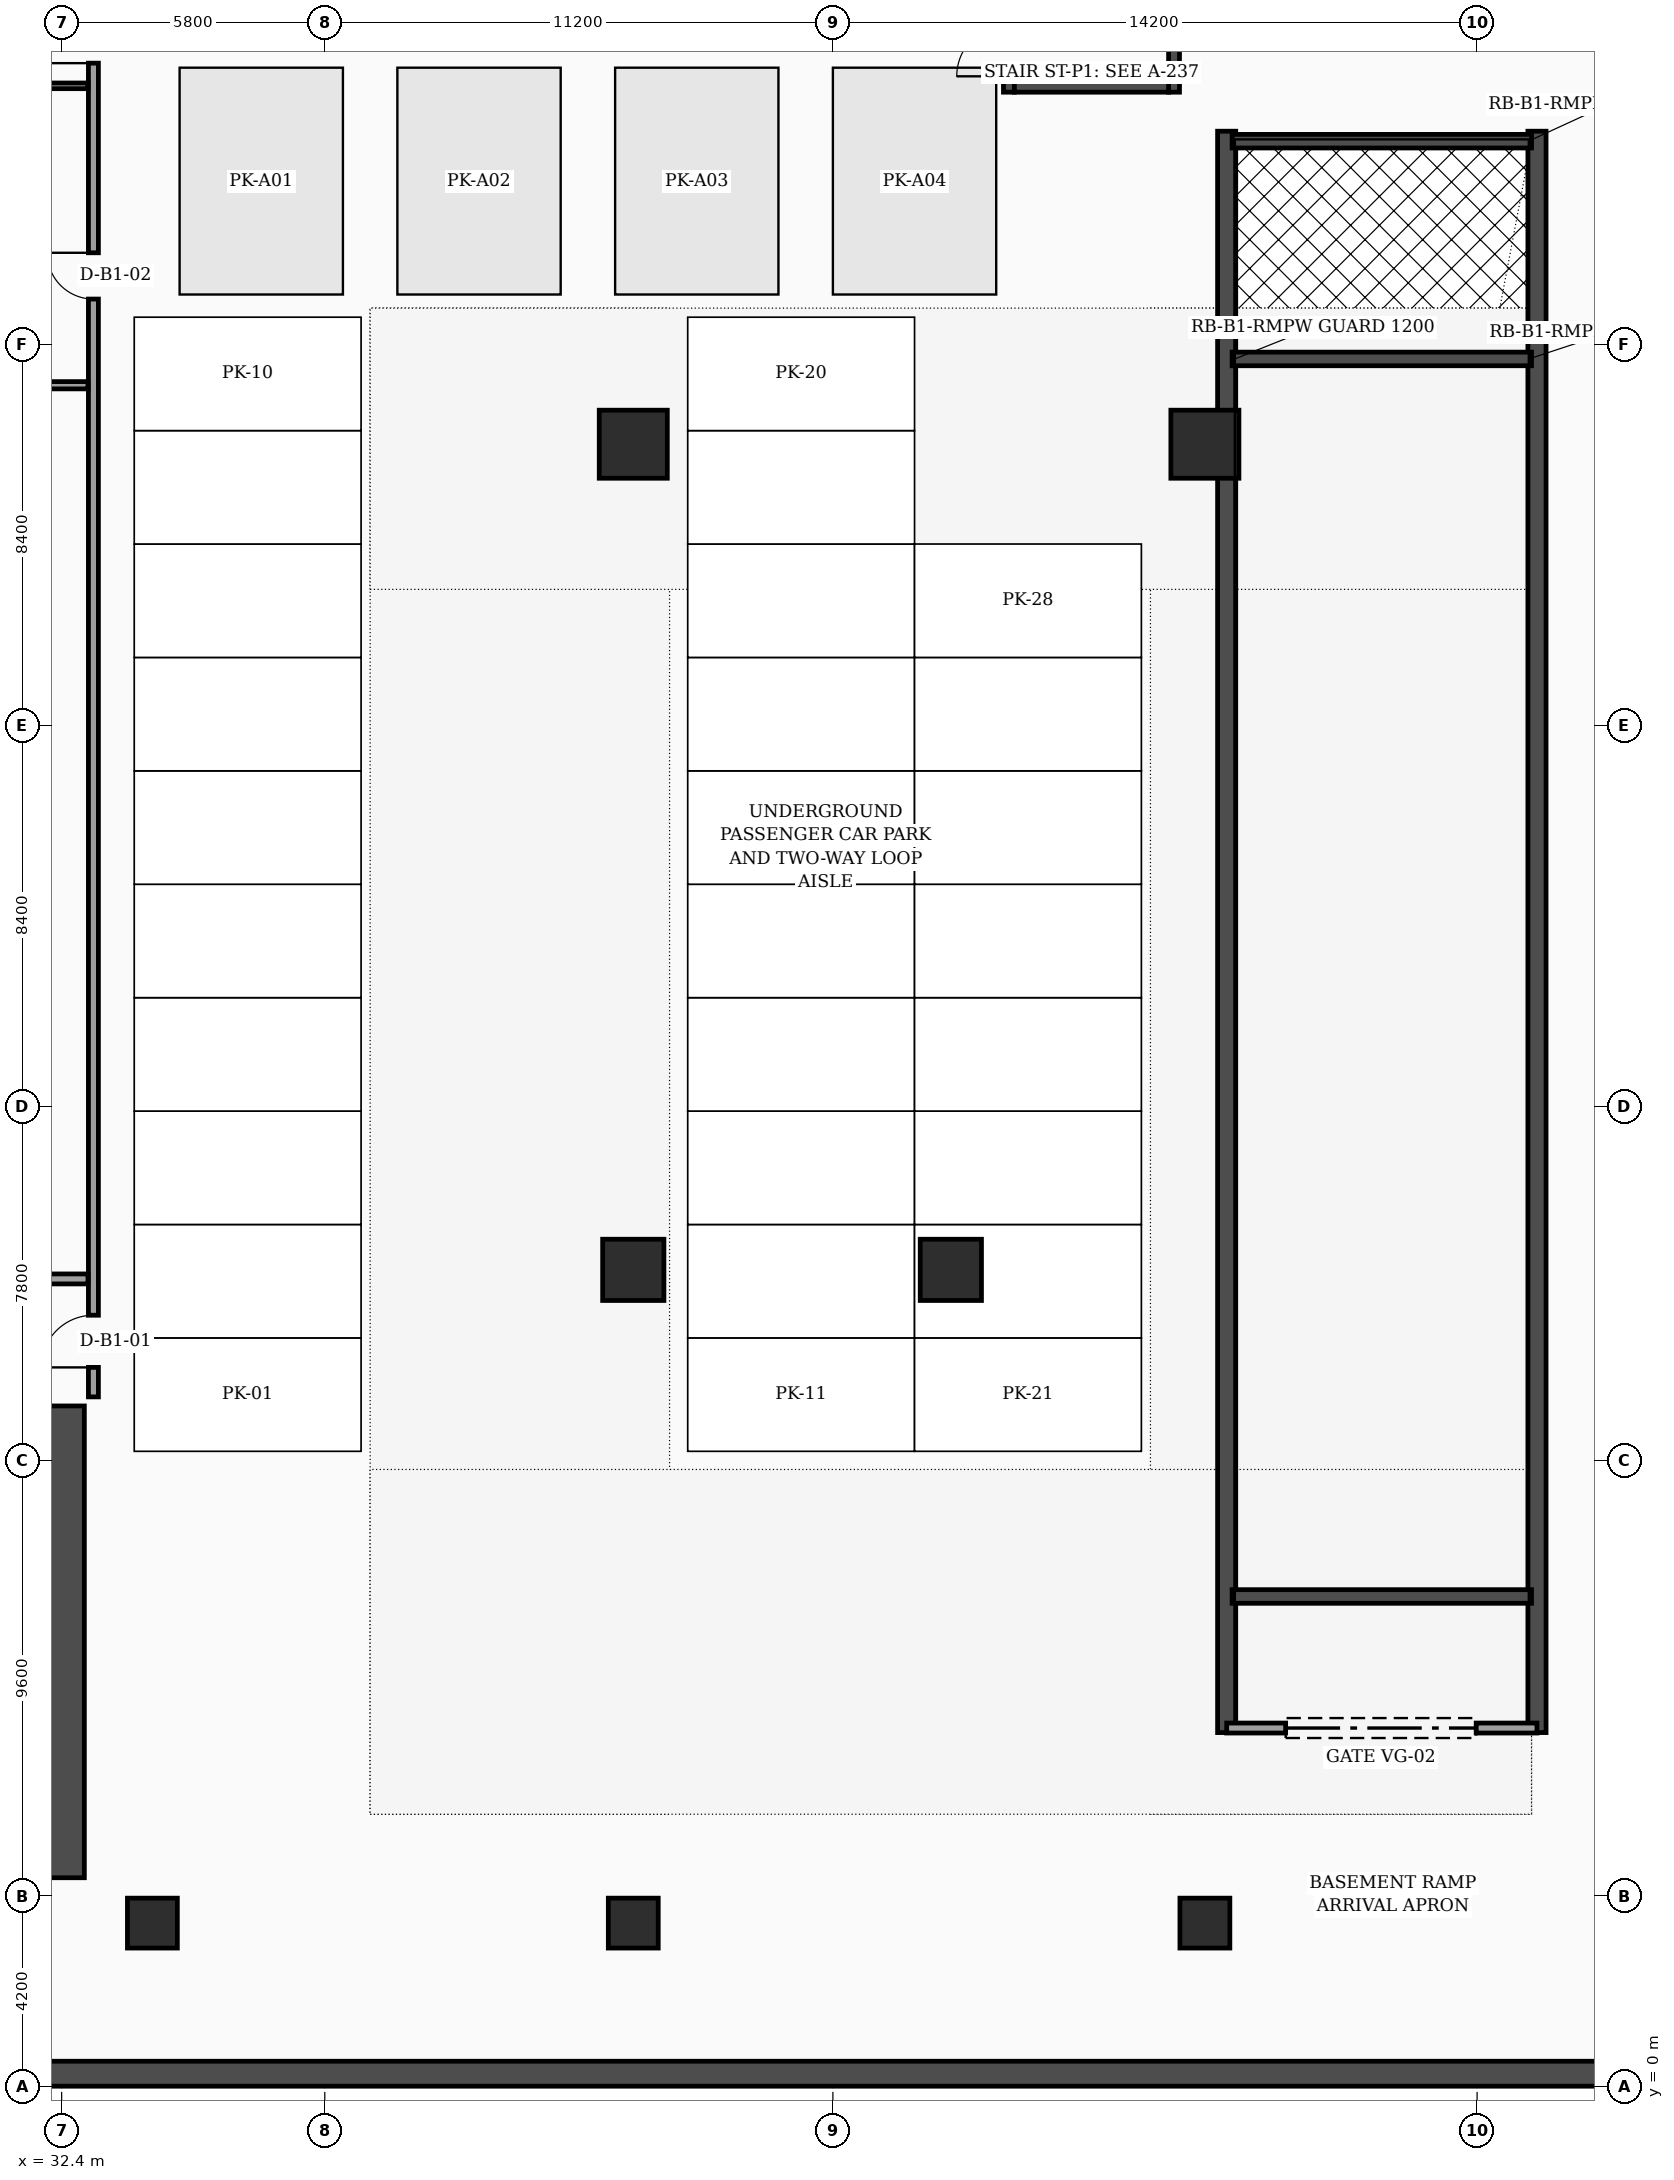
"""IFC4 building model, lengths in metres.
Left out: names, types, materials, properties, quantities, classifications, styles, units other than length and angle.
Written with IfcOpenShell. Run it as: python <this file> out.ifc"""

import sys

from ifc_helpers import new_model, si_unit, direction, frame, frame_2d, origin, origin_2d, place, context, subcontext, project, spatial, rectangle, hollow_rectangle, extrude, element, fill, save


model = new_model("IFC4")
c1 = context("Model", 3, precision=1e-05, world=origin(), true_north=direction((0.0, 1.0)))
c2 = subcontext(c1, "Body", "Model", "MODEL_VIEW")
j1 = project(units=[si_unit("LENGTHUNIT", "METRE"), si_unit("PLANEANGLEUNIT", "RADIAN")], contexts=[c1])
p1 = place(None, origin())
s1 = spatial("IfcSite", under=j1, at=p1, CompositionType="ELEMENT")
p2 = place(p1, origin())
s2 = spatial("IfcBuilding", under=s1, at=p2, CompositionType="ELEMENT")
p3 = place(p2, frame((0.0, 0.0, -5.2)))
s3 = spatial("IfcBuildingStorey", under=s2, at=p3, CompositionType="ELEMENT", Elevation=-5.2)
p4 = place(p3, frame((0.28, 0.28, 0.0), z_axis=(0.0, 0.0, 1.0), x_axis=(1.0, 0.0, 0.0)))
e1 = element("IfcWall", 1, at=p4, inside=s3, PredefinedType="USERDEFINED", context=c2, shape_type="SweptSolid", body=[
    extrude(rectangle(XDim=83.44, YDim=0.55, at=frame_2d((41.72, 0.0))), origin(), (0.0, 0.0, 1.0), 4.88),
])
p5 = place(p3, frame((32.4, 4.6, 0.0), z_axis=(0.0, 0.0, 1.0), x_axis=(0.0, 1.0, 0.0)))
e2 = element("IfcWall", 2, at=p5, inside=s3, PredefinedType="SHEAR", context=c2, shape_type="SweptSolid", body=[
    extrude(rectangle(XDim=10.4, YDim=1.0, at=frame_2d((5.2, 0.0))), origin(), (0.0, 0.0, 1.0), 4.88),
])
p6 = place(p3, frame((53.28, 43.96, 0.0), z_axis=(0.0, 0.0, 1.0), x_axis=(0.0, 1.0, 0.0)))
e3 = element("IfcWall", 3, at=p6, inside=s3, PredefinedType="SOLIDWALL", context=c2, shape_type="SweptSolid", body=[
    extrude(rectangle(XDim=9.58, YDim=0.24, at=frame_2d((4.79, 0.0))), origin(), (0.0, 0.0, 1.0), 4.88),
])
p7 = place(p6, frame((0.35, 0.0, 0.0)))
e4 = element("IfcOpeningElement", 4, at=p7, cuts=e3, PredefinedType="OPENING", context=c2, shape_type="SweptSolid", body=[
    extrude(rectangle(XDim=1.15, YDim=2.2, at=frame_2d((0.575, 1.1))), frame((0.0, 0.13, 0.0), z_axis=(0.0, -1.0, 0.0), x_axis=(1.0, 0.0, 0.0)), (0.0, 0.0, 1.0), 0.26),
])
p8 = place(p3, frame((56.92, 43.96, 0.0), z_axis=(0.0, 0.0, 1.0), x_axis=(0.0, 1.0, 0.0)))
e5 = element("IfcWall", 5, at=p8, inside=s3, PredefinedType="SOLIDWALL", context=c2, shape_type="SweptSolid", body=[
    extrude(rectangle(XDim=9.58, YDim=0.24, at=frame_2d((4.79, 0.0))), origin(), (0.0, 0.0, 1.0), 4.88),
])
p9 = place(p3, frame((53.4, 44.08, 0.0), z_axis=(0.0, 0.0, 1.0), x_axis=(1.0, 0.0, 0.0)))
e6 = element("IfcWall", 6, at=p9, inside=s3, PredefinedType="SOLIDWALL", context=c2, shape_type="SweptSolid", body=[
    extrude(rectangle(XDim=3.4, YDim=0.24, at=frame_2d((1.7, 0.0))), origin(), (0.0, 0.0, 1.0), 4.88),
])
for number, where, z_axis, x_axis in (
    (7, (34.4, 3.6, 0.0), (0.0, 0.0, 1.0), (1.0, 0.0, 0.0)),
    (8, (45.0, 3.6, 0.0), (0.0, 0.0, 1.0), (1.0, 0.0, 0.0)),
    (9, (57.6, 3.6, 0.0), (0.0, 0.0, 1.0), (1.0, 0.0, 0.0)),
):
    element("IfcColumn", number, at=place(p3, frame(where, z_axis=z_axis, x_axis=x_axis)), inside=s3, PredefinedType="COLUMN", context=c2, shape_type="SweptSolid", body=[
        extrude(hollow_rectangle(XDim=1.1, YDim=1.1, WallThickness=0.045, at=origin_2d()), origin(), (0.0, 0.0, 1.0), 4.88),
    ])
for number, where, z_axis, x_axis in (
    (10, (45.0, 36.2, 0.0), (0.0, 0.0, 1.0), (1.0, 0.0, 0.0)),
    (11, (57.6, 36.2, 0.0), (0.0, 0.0, 1.0), (1.0, 0.0, 0.0)),
):
    element("IfcColumn", number, at=place(p3, frame(where, z_axis=z_axis, x_axis=x_axis)), inside=s3, PredefinedType="COLUMN", context=c2, shape_type="SweptSolid", body=[
        extrude(rectangle(XDim=1.5, YDim=1.5, at=origin_2d()), origin(), (0.0, 0.0, 1.0), 4.88),
    ])
for number, where, z_axis, x_axis in (
    (12, (45.0, 18.0, 0.0), (0.0, 0.0, 1.0), (1.0, 0.0, 0.0)),
    (13, (52.0, 18.0, 0.0), (0.0, 0.0, 1.0), (1.0, 0.0, 0.0)),
):
    element("IfcColumn", number, at=place(p3, frame(where, z_axis=z_axis, x_axis=x_axis)), inside=s3, PredefinedType="COLUMN", context=c2, shape_type="SweptSolid", body=[
        extrude(rectangle(XDim=1.35, YDim=1.35, at=origin_2d()), origin(), (0.0, 0.0, 1.0), 4.88),
    ])
for number, where, z_axis, x_axis in (
    (14, (58.08, 7.8, 0.0), (0.0, 0.0, 1.0), (0.0, 1.0, 0.0)),
    (15, (64.92, 7.8, 0.0), (0.0, 0.0, 1.0), (0.0, 1.0, 0.0)),
):
    element("IfcWall", number, at=place(p3, frame(where, z_axis=z_axis, x_axis=x_axis)), inside=s3, PredefinedType="USERDEFINED", context=c2, shape_type="SweptSolid", body=[
        extrude(rectangle(XDim=35.3, YDim=0.4, at=frame_2d((17.65, 0.0))), origin(), (0.0, 0.0, 1.0), 4.88),
    ])
p10 = place(p3, frame((58.2, 10.8, 0.0), z_axis=(0.0, 0.0, 1.0), x_axis=(1.0, 0.0, 0.0)))
e16 = element("IfcWall", 16, at=p10, inside=s3, PredefinedType="SOLIDWALL", context=c2, shape_type="SweptSolid", body=[
    extrude(rectangle(XDim=6.6, YDim=0.3, at=frame_2d((3.3, 0.0))), origin(), (0.0, 0.0, 1.0), 0.4),
])
p11 = place(p3, frame((58.2, 38.08, 0.0), z_axis=(0.0, 0.0, 1.0), x_axis=(1.0, 0.0, 0.0)))
e17 = element("IfcWall", 17, at=p11, inside=s3, PredefinedType="SOLIDWALL", context=c2, shape_type="SweptSolid", body=[
    extrude(rectangle(XDim=6.6, YDim=0.3, at=frame_2d((3.3, 0.0))), origin(), (0.0, 0.0, 1.0), 4.8),
])
p12 = place(p3, frame((58.2, 42.88, 0.0), z_axis=(0.0, 0.0, 1.0), x_axis=(1.0, 0.0, 0.0)))
e18 = element("IfcWall", 18, at=p12, inside=s3, PredefinedType="SOLIDWALL", context=c2, shape_type="SweptSolid", body=[
    extrude(rectangle(XDim=6.6, YDim=0.3, at=frame_2d((3.3, 0.0))), origin(), (0.0, 0.0, 1.0), 4.88),
])
p13 = place(p3, frame((58.08, 7.9, 0.0), z_axis=(0.0, 0.0, 1.0), x_axis=(1.0, 0.0, 0.0)))
e19 = element("IfcWall", 19, at=p13, inside=s3, PredefinedType="SOLIDWALL", context=c2, shape_type="SweptSolid", body=[
    extrude(rectangle(XDim=6.84, YDim=0.22, at=frame_2d((3.42, 0.0))), origin(), (0.0, 0.0, 1.0), 4.08),
])
p14 = place(p13, frame((1.3, 0.0, 0.0)))
e20 = element("IfcOpeningElement", 20, at=p14, cuts=e19, PredefinedType="OPENING", context=c2, shape_type="SweptSolid", body=[
    extrude(rectangle(XDim=4.2, YDim=2.8, at=frame_2d((2.1, 1.4))), frame((0.0, 0.12, 0.0), z_axis=(0.0, -1.0, 0.0), x_axis=(1.0, 0.0, 0.0)), (0.0, 0.0, 1.0), 0.24),
])
p15 = place(p3, frame((33.1, 15.2, 0.0), z_axis=(0.0, 0.0, 1.0), x_axis=(0.0, 1.0, 0.0)))
e21 = element("IfcWall", 21, at=p15, inside=s3, PredefinedType="SOLIDWALL", context=c2, shape_type="SweptSolid", body=[
    extrude(rectangle(XDim=42.38, YDim=0.22, at=frame_2d((21.19, 0.0))), origin(), (0.0, 0.0, 1.0), 4.08),
])
p16 = place(p15, frame((0.65, 0.0, 0.0)))
e22 = element("IfcOpeningElement", 22, at=p16, cuts=e21, PredefinedType="OPENING", context=c2, shape_type="SweptSolid", body=[
    extrude(rectangle(XDim=1.15, YDim=2.2, at=frame_2d((0.575, 1.1))), frame((0.0, 0.12, 0.0), z_axis=(0.0, -1.0, 0.0), x_axis=(1.0, 0.0, 0.0)), (0.0, 0.0, 1.0), 0.24),
])
p17 = place(p15, frame((24.2, 0.0, 0.0)))
e23 = element("IfcOpeningElement", 23, at=p17, cuts=e21, PredefinedType="OPENING", context=c2, shape_type="SweptSolid", body=[
    extrude(rectangle(XDim=1.02, YDim=2.2, at=frame_2d((0.51, 1.1))), frame((0.0, 0.12, 0.0), z_axis=(0.0, -1.0, 0.0), x_axis=(1.0, 0.0, 0.0)), (0.0, 0.0, 1.0), 0.24),
])
p18 = place(p15, frame((29.4, 0.0, 0.0)))
e24 = element("IfcOpeningElement", 24, at=p18, cuts=e21, PredefinedType="OPENING", context=c2, shape_type="SweptSolid", body=[
    extrude(rectangle(XDim=0.98, YDim=2.15, at=frame_2d((0.49, 1.075))), frame((0.0, 0.12, 0.0), z_axis=(0.0, -1.0, 0.0), x_axis=(1.0, 0.0, 0.0)), (0.0, 0.0, 1.0), 0.24),
])
p19 = place(p3, frame((15.2, 17.8, 0.0), z_axis=(0.0, 0.0, 1.0), x_axis=(1.0, 0.0, 0.0)))
e25 = element("IfcWall", 25, at=p19, inside=s3, PredefinedType="SOLIDWALL", context=c2, shape_type="SweptSolid", body=[
    extrude(rectangle(XDim=17.78, YDim=0.22, at=frame_2d((8.89, 0.0))), origin(), (0.0, 0.0, 1.0), 4.88),
])
p20 = place(p19, frame((5.0, 0.0, 0.0)))
e26 = element("IfcOpeningElement", 26, at=p20, cuts=e25, PredefinedType="OPENING", context=c2, shape_type="SweptSolid", body=[
    extrude(rectangle(XDim=1.6, YDim=2.35, at=frame_2d((0.8, 1.175))), frame((0.0, 0.12, 0.0), z_axis=(0.0, -1.0, 0.0), x_axis=(1.0, 0.0, 0.0)), (0.0, 0.0, 1.0), 0.24),
])
p21 = place(p3, frame((15.2, 37.5, 0.0), z_axis=(0.0, 0.0, 1.0), x_axis=(1.0, 0.0, 0.0)))
e27 = element("IfcWall", 27, at=p21, inside=s3, PredefinedType="PARTITIONING", context=c2, shape_type="SweptSolid", body=[
    extrude(rectangle(XDim=17.78, YDim=0.16, at=frame_2d((8.89, 0.0))), origin(), (0.0, 0.0, 1.0), 4.38),
])
p22 = place(p21, frame((3.5, 0.0, 0.0)))
e28 = element("IfcOpeningElement", 28, at=p22, cuts=e27, PredefinedType="OPENING", context=c2, shape_type="SweptSolid", body=[
    extrude(rectangle(XDim=1.02, YDim=2.2, at=frame_2d((0.51, 1.1))), frame((0.0, 0.09, 0.0), z_axis=(0.0, -1.0, 0.0), x_axis=(1.0, 0.0, 0.0)), (0.0, 0.0, 1.0), 0.18),
])
p23 = place(p3, frame((26.6, 44.1, 0.0), z_axis=(0.0, 0.0, 1.0), x_axis=(1.0, 0.0, 0.0)))
e29 = element("IfcWall", 29, at=p23, inside=s3, PredefinedType="PARTITIONING", context=c2, shape_type="SweptSolid", body=[
    extrude(rectangle(XDim=6.38, YDim=0.125, at=frame_2d((3.19, 0.0))), origin(), (0.0, 0.0, 1.0), 4.88),
])
p24 = place(p14, origin())
e30 = element("IfcDoor", 30, at=p24, inside=s3, OperationType="ROLLINGUP", PredefinedType="GATE", context=c2, shape_type="SweptSolid", body=[
    extrude(rectangle(XDim=4.2, YDim=2.8, at=frame_2d((2.1, 1.4))), frame((0.0, 0.025, 0.0), z_axis=(0.0, -1.0, 0.0), x_axis=(1.0, 0.0, 0.0)), (0.0, 0.0, 1.0), 0.05),
])
fill(e20, e30)
p25 = place(p16, origin())
e31 = element("IfcDoor", 31, at=p25, inside=s3, OperationType="SINGLE_SWING_LEFT", PredefinedType="DOOR", context=c2, shape_type="SweptSolid", body=[
    extrude(rectangle(XDim=1.15, YDim=2.2, at=frame_2d((0.575, 1.1))), frame((0.0, 0.025, 0.0), z_axis=(0.0, -1.0, 0.0), x_axis=(1.0, 0.0, 0.0)), (0.0, 0.0, 1.0), 0.05),
])
fill(e22, e31)
p26 = place(p17, origin())
e32 = element("IfcDoor", 32, at=p26, inside=s3, OperationType="SINGLE_SWING_RIGHT", PredefinedType="DOOR", context=c2, shape_type="SweptSolid", body=[
    extrude(rectangle(XDim=1.02, YDim=2.2, at=frame_2d((0.51, 1.1))), frame((0.0, 0.025, 0.0), z_axis=(0.0, -1.0, 0.0), x_axis=(1.0, 0.0, 0.0)), (0.0, 0.0, 1.0), 0.05),
])
fill(e23, e32)
p27 = place(p18, origin())
e33 = element("IfcDoor", 33, at=p27, inside=s3, OperationType="SINGLE_SWING_LEFT", PredefinedType="DOOR", context=c2, shape_type="SweptSolid", body=[
    extrude(rectangle(XDim=0.98, YDim=2.15, at=frame_2d((0.49, 1.075))), frame((0.0, 0.025, 0.0), z_axis=(0.0, -1.0, 0.0), x_axis=(1.0, 0.0, 0.0)), (0.0, 0.0, 1.0), 0.05),
])
fill(e24, e33)
p28 = place(p7, origin())
e34 = element("IfcDoor", 34, at=p28, inside=s3, OperationType="SINGLE_SWING_LEFT", PredefinedType="DOOR", context=c2, shape_type="SweptSolid", body=[
    extrude(rectangle(XDim=1.15, YDim=2.2, at=frame_2d((0.575, 1.1))), frame((0.0, 0.025, 0.0), z_axis=(0.0, -1.0, 0.0), x_axis=(1.0, 0.0, 0.0)), (0.0, 0.0, 1.0), 0.05),
])
fill(e4, e34)
save(model, sys.argv[1])
